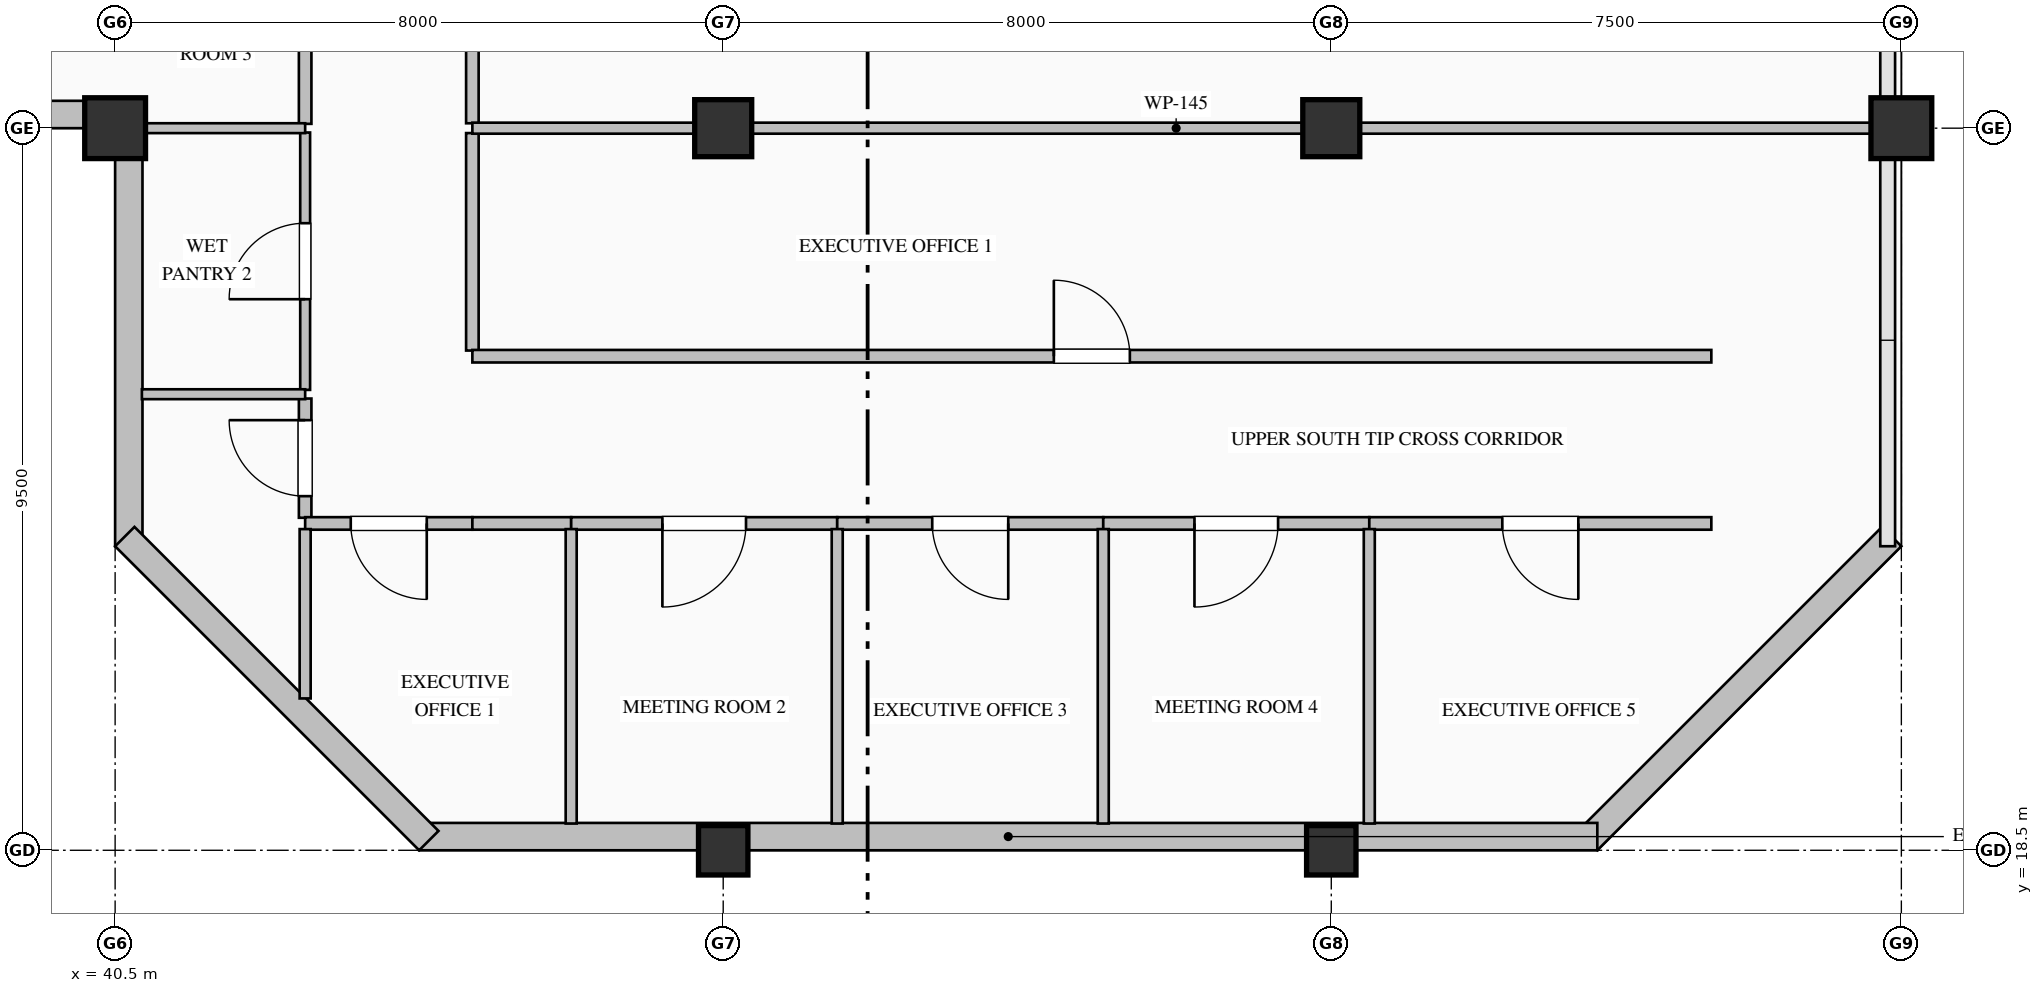
"""IFC4 building model, lengths in metres.
Left out: names, types, materials, properties, quantities, classifications, styles, units other than length and angle.
Written with IfcOpenShell. Run it as: python <this file> out.ifc"""

import sys

from ifc_helpers import new_model, si_unit, direction, frame, frame_2d, origin, origin_2d, place, context, subcontext, project, spatial, rectangle, hollow_rectangle, extrude, element, fill, save


model = new_model("IFC4")
c1 = context("Model", 3, precision=1e-05, world=origin(), true_north=direction((0.0, 1.0)))
c2 = subcontext(c1, "Body", "Model", "MODEL_VIEW")
j1 = project(units=[si_unit("LENGTHUNIT", "METRE"), si_unit("PLANEANGLEUNIT", "RADIAN")], contexts=[c1])
p1 = place(None, origin())
s1 = spatial("IfcSite", under=j1, at=p1, CompositionType="ELEMENT")
p2 = place(p1, origin())
s2 = spatial("IfcBuilding", under=s1, at=p2, CompositionType="ELEMENT")
p3 = place(p2, frame((0.0, 0.0, 299.2)))
s3 = spatial("IfcBuildingStorey", under=s2, at=p3, CompositionType="ELEMENT", Elevation=299.2)
p4 = place(p3, frame((40.5, 28.0, 0.0), z_axis=(0.0, 0.0, 1.0), x_axis=(1.0, 0.0, 0.0)))
e1 = element("IfcColumn", 1, at=p4, inside=s3, PredefinedType="COLUMN", context=c2, shape_type="SweptSolid", body=[
    extrude(hollow_rectangle(XDim=0.8, YDim=0.8, WallThickness=0.032, at=origin_2d()), origin(), (0.0, 0.0, 1.0), 4.0),
])
p5 = place(p3, frame((48.5, 18.5, 0.0), z_axis=(0.0, 0.0, 1.0), x_axis=(1.0, 0.0, 0.0)))
e2 = element("IfcColumn", 2, at=p5, inside=s3, PredefinedType="COLUMN", context=c2, shape_type="SweptSolid", body=[
    extrude(hollow_rectangle(XDim=0.65, YDim=0.65, WallThickness=0.028, at=origin_2d()), origin(), (0.0, 0.0, 1.0), 4.0),
])
p6 = place(p3, frame((48.5, 28.0, 0.0), z_axis=(0.0, 0.0, 1.0), x_axis=(1.0, 0.0, 0.0)))
e3 = element("IfcColumn", 3, at=p6, inside=s3, PredefinedType="COLUMN", context=c2, shape_type="SweptSolid", body=[
    extrude(rectangle(XDim=0.75, YDim=0.75, at=origin_2d()), origin(), (0.0, 0.0, 1.0), 4.0),
])
p7 = place(p3, frame((56.5, 18.5, 0.0), z_axis=(0.0, 0.0, 1.0), x_axis=(1.0, 0.0, 0.0)))
e4 = element("IfcColumn", 4, at=p7, inside=s3, PredefinedType="COLUMN", context=c2, shape_type="SweptSolid", body=[
    extrude(hollow_rectangle(XDim=0.65, YDim=0.65, WallThickness=0.028, at=origin_2d()), origin(), (0.0, 0.0, 1.0), 4.0),
])
p8 = place(p3, frame((56.5, 28.0, 0.0), z_axis=(0.0, 0.0, 1.0), x_axis=(1.0, 0.0, 0.0)))
e5 = element("IfcColumn", 5, at=p8, inside=s3, PredefinedType="COLUMN", context=c2, shape_type="SweptSolid", body=[
    extrude(rectangle(XDim=0.75, YDim=0.75, at=origin_2d()), origin(), (0.0, 0.0, 1.0), 4.0),
])
p9 = place(p3, frame((64.0, 28.0, 0.0), z_axis=(0.0, 0.0, 1.0), x_axis=(1.0, 0.0, 0.0)))
e6 = element("IfcColumn", 6, at=p9, inside=s3, PredefinedType="COLUMN", context=c2, shape_type="SweptSolid", body=[
    extrude(hollow_rectangle(XDim=0.8, YDim=0.8, WallThickness=0.032, at=origin_2d()), origin(), (0.0, 0.0, 1.0), 4.0),
])
p10 = place(p3, frame((40.68, 22.5, 0.0), z_axis=(0.0, 0.0, 1.0), x_axis=(0.0, 1.0, 0.0)))
e7 = element("IfcWall", 7, at=p10, inside=s3, PredefinedType="SOLIDWALL", context=c2, shape_type="SweptSolid", body=[
    extrude(rectangle(XDim=5.86, YDim=0.36, at=frame_2d((2.93, 0.0))), origin(), (0.0, 0.0, 1.0), 3.185),
])
p11 = place(p3, frame((40.52, 28.18, 0.0), z_axis=(0.0, 0.0, 1.0), x_axis=(-1.0, 0.0, 0.0)))
e8 = element("IfcWall", 8, at=p11, inside=s3, PredefinedType="SOLIDWALL", context=c2, shape_type="SweptSolid", body=[
    extrude(rectangle(XDim=20.02, YDim=0.36, at=frame_2d((10.01, 0.0))), origin(), (0.0, 0.0, 1.0), 3.185),
])
p12 = place(p11, frame((3.075, 0.0, 0.8)))
e9 = element("IfcOpeningElement", 9, at=p12, cuts=e8, PredefinedType="OPENING", context=c2, shape_type="SweptSolid", body=[
    extrude(rectangle(XDim=1.05, YDim=2.15, at=frame_2d((0.525, 1.075))), frame((0.0, 0.19, 0.0), z_axis=(0.0, -1.0, 0.0), x_axis=(1.0, 0.0, 0.0)), (0.0, 0.0, 1.0), 0.38),
])
p13 = place(p11, frame((10.325, 0.0, 0.9)))
e10 = element("IfcOpeningElement", 10, at=p13, cuts=e8, PredefinedType="OPENING", context=c2, shape_type="SweptSolid", body=[
    extrude(rectangle(XDim=0.95, YDim=1.85, at=frame_2d((0.475, 0.925))), frame((0.0, 0.19, 0.0), z_axis=(0.0, -1.0, 0.0), x_axis=(1.0, 0.0, 0.0)), (0.0, 0.0, 1.0), 0.38),
])
p14 = place(p11, frame((13.875, 0.0, 0.8)))
e11 = element("IfcOpeningElement", 11, at=p14, cuts=e8, PredefinedType="OPENING", context=c2, shape_type="SweptSolid", body=[
    extrude(rectangle(XDim=1.05, YDim=2.15, at=frame_2d((0.525, 1.075))), frame((0.0, 0.19, 0.0), z_axis=(0.0, -1.0, 0.0), x_axis=(1.0, 0.0, 0.0)), (0.0, 0.0, 1.0), 0.38),
])
p15 = place(p3, frame((63.873, 22.627, 0.0), z_axis=(0.0, 0.0, 1.0), x_axis=(-0.707106781187, -0.707106781187, 0.0)))
e12 = element("IfcWall", 12, at=p15, inside=s3, PredefinedType="SOLIDWALL", context=c2, shape_type="SweptSolid", body=[
    extrude(rectangle(XDim=5.657, YDim=0.36, at=frame_2d((2.828, 0.0))), origin(), (0.0, 0.0, 1.0), 3.785),
])
p16 = place(p3, frame((60.0, 18.68, 0.0), z_axis=(0.0, 0.0, 1.0), x_axis=(-1.0, 0.0, 0.0)))
e13 = element("IfcWall", 13, at=p16, inside=s3, PredefinedType="SOLIDWALL", context=c2, shape_type="SweptSolid", body=[
    extrude(rectangle(XDim=15.5, YDim=0.36, at=frame_2d((7.75, 0.0))), origin(), (0.0, 0.0, 1.0), 3.335),
])
p17 = place(p3, frame((44.627, 18.627, 0.0), z_axis=(0.0, 0.0, 1.0), x_axis=(-0.707106781187, 0.707106781187, 0.0)))
e14 = element("IfcWall", 14, at=p17, inside=s3, PredefinedType="SOLIDWALL", context=c2, shape_type="SweptSolid", body=[
    extrude(rectangle(XDim=5.657, YDim=0.36, at=frame_2d((2.828, 0.0))), origin(), (0.0, 0.0, 1.0), 3.785),
])
p18 = place(p3, frame((45.2, 27.936, 0.0), z_axis=(0.0, 0.0, 1.0), x_axis=(0.0, -1.0, 0.0)))
e15 = element("IfcWall", 15, at=p18, inside=s3, PredefinedType="PARTITIONING", context=c2, shape_type="SweptSolid", body=[
    extrude(rectangle(XDim=2.861, YDim=0.165, at=frame_2d((1.431, 0.0))), origin(), (0.0, 0.0, 1.0), 3.785),
])
p19 = place(p3, frame((45.2, 31.736, 0.0), z_axis=(0.0, 0.0, 1.0), x_axis=(0.0, -1.0, 0.0)))
e16 = element("IfcWall", 16, at=p19, inside=s3, PredefinedType="PARTITIONING", context=c2, shape_type="SweptSolid", body=[
    extrude(rectangle(XDim=3.671, YDim=0.165, at=frame_2d((1.835, 0.0))), origin(), (0.0, 0.0, 1.0), 3.785),
])
p20 = place(p19, frame((1.285, 0.0, 0.0)))
e17 = element("IfcOpeningElement", 17, at=p20, cuts=e16, PredefinedType="OPENING", context=c2, shape_type="SweptSolid", body=[
    extrude(rectangle(XDim=1.1, YDim=2.2, at=frame_2d((0.55, 1.1))), frame((0.0, 0.093, 0.0), z_axis=(0.0, -1.0, 0.0), x_axis=(1.0, 0.0, 0.0)), (0.0, 0.0, 1.0), 0.185),
])
p21 = place(p3, frame((43.0, 22.875, 0.0), z_axis=(0.0, 0.0, 1.0), x_axis=(0.0, 1.0, 0.0)))
e18 = element("IfcWall", 18, at=p21, inside=s3, PredefinedType="PARTITIONING", context=c2, shape_type="SweptSolid", body=[
    extrude(rectangle(XDim=1.569, YDim=0.165, at=frame_2d((0.784, 0.0))), origin(), (0.0, 0.0, 1.0), 3.785),
])
p22 = place(p21, frame((0.284, 0.0, 0.0)))
e19 = element("IfcOpeningElement", 19, at=p22, cuts=e18, PredefinedType="OPENING", context=c2, shape_type="SweptSolid", body=[
    extrude(rectangle(XDim=1.0, YDim=2.15, at=frame_2d((0.5, 1.075))), frame((0.0, 0.093, 0.0), z_axis=(0.0, -1.0, 0.0), x_axis=(1.0, 0.0, 0.0)), (0.0, 0.0, 1.0), 0.185),
])
p23 = place(p3, frame((43.0, 24.557, 0.0), z_axis=(0.0, 0.0, 1.0), x_axis=(0.0, 1.0, 0.0)))
e20 = element("IfcWall", 20, at=p23, inside=s3, PredefinedType="PARTITIONING", context=c2, shape_type="SweptSolid", body=[
    extrude(rectangle(XDim=3.386, YDim=0.13, at=frame_2d((1.693, 0.0))), origin(), (0.0, 0.0, 1.0), 3.785),
])
p24 = place(p23, frame((1.193, 0.0, 0.0)))
e21 = element("IfcOpeningElement", 21, at=p24, cuts=e20, PredefinedType="OPENING", context=c2, shape_type="SweptSolid", body=[
    extrude(rectangle(XDim=1.0, YDim=2.15, at=frame_2d((0.5, 1.075))), frame((0.0, 0.075, 0.0), z_axis=(0.0, -1.0, 0.0), x_axis=(1.0, 0.0, 0.0)), (0.0, 0.0, 1.0), 0.15),
])
p25 = place(p3, frame((43.0, 28.057, 0.0), z_axis=(0.0, 0.0, 1.0), x_axis=(0.0, 1.0, 0.0)))
e22 = element("IfcWall", 22, at=p25, inside=s3, PredefinedType="PARTITIONING", context=c2, shape_type="SweptSolid", body=[
    extrude(rectangle(XDim=5.469, YDim=0.165, at=frame_2d((2.734, 0.0))), origin(), (0.0, 0.0, 1.0), 3.785),
])
p26 = place(p25, frame((2.234, 0.0, 0.0)))
e23 = element("IfcOpeningElement", 23, at=p26, cuts=e22, PredefinedType="OPENING", context=c2, shape_type="SweptSolid", body=[
    extrude(rectangle(XDim=1.0, YDim=2.15, at=frame_2d((0.5, 1.075))), frame((0.0, 0.093, 0.0), z_axis=(0.0, -1.0, 0.0), x_axis=(1.0, 0.0, 0.0)), (0.0, 0.0, 1.0), 0.185),
])
p27 = place(p3, frame((45.2, 22.8, 0.0), z_axis=(0.0, 0.0, 1.0), x_axis=(-1.0, 0.0, 0.0)))
e24 = element("IfcWall", 24, at=p27, inside=s3, PredefinedType="PARTITIONING", context=c2, shape_type="SweptSolid", body=[
    extrude(rectangle(XDim=2.2, YDim=0.165, at=frame_2d((1.1, 0.0))), origin(), (0.0, 0.0, 1.0), 3.785),
])
p28 = place(p27, frame((0.6, 0.0, 0.0)))
e25 = element("IfcOpeningElement", 25, at=p28, cuts=e24, PredefinedType="OPENING", context=c2, shape_type="SweptSolid", body=[
    extrude(rectangle(XDim=1.0, YDim=2.15, at=frame_2d((0.5, 1.075))), frame((0.0, 0.093, 0.0), z_axis=(0.0, -1.0, 0.0), x_axis=(1.0, 0.0, 0.0)), (0.0, 0.0, 1.0), 0.185),
])
p29 = place(p3, frame((45.2, 25.0, 0.0), z_axis=(0.0, 0.0, 1.0), x_axis=(1.0, 0.0, 0.0)))
e26 = element("IfcWall", 26, at=p29, inside=s3, PredefinedType="PARTITIONING", context=c2, shape_type="SweptSolid", body=[
    extrude(rectangle(XDim=16.3, YDim=0.165, at=frame_2d((8.15, 0.0))), origin(), (0.0, 0.0, 1.0), 3.785),
])
p30 = place(p29, frame((7.65, 0.0, 0.0)))
e27 = element("IfcOpeningElement", 27, at=p30, cuts=e26, PredefinedType="OPENING", context=c2, shape_type="SweptSolid", body=[
    extrude(rectangle(XDim=1.0, YDim=2.15, at=frame_2d((0.5, 1.075))), frame((0.0, 0.093, 0.0), z_axis=(0.0, -1.0, 0.0), x_axis=(1.0, 0.0, 0.0)), (0.0, 0.0, 1.0), 0.185),
])
p31 = place(p3, frame((46.5, 22.8, 0.0), z_axis=(0.0, 0.0, 1.0), x_axis=(-1.0, 0.0, 0.0)))
e28 = element("IfcWall", 28, at=p31, inside=s3, PredefinedType="PARTITIONING", context=c2, shape_type="SweptSolid", body=[
    extrude(rectangle(XDim=1.3, YDim=0.165, at=frame_2d((0.65, 0.0))), origin(), (0.0, 0.0, 1.0), 3.785),
])
p32 = place(p3, frame((50.0, 22.8, 0.0), z_axis=(0.0, 0.0, 1.0), x_axis=(-1.0, 0.0, 0.0)))
e29 = element("IfcWall", 29, at=p32, inside=s3, PredefinedType="PARTITIONING", context=c2, shape_type="SweptSolid", body=[
    extrude(rectangle(XDim=3.5, YDim=0.165, at=frame_2d((1.75, 0.0))), origin(), (0.0, 0.0, 1.0), 3.785),
])
p33 = place(p32, frame((1.2, 0.0, 0.0)))
e30 = element("IfcOpeningElement", 30, at=p33, cuts=e29, PredefinedType="OPENING", context=c2, shape_type="SweptSolid", body=[
    extrude(rectangle(XDim=1.1, YDim=2.2, at=frame_2d((0.55, 1.1))), frame((0.0, 0.093, 0.0), z_axis=(0.0, -1.0, 0.0), x_axis=(1.0, 0.0, 0.0)), (0.0, 0.0, 1.0), 0.185),
])
p34 = place(p3, frame((53.5, 22.8, 0.0), z_axis=(0.0, 0.0, 1.0), x_axis=(-1.0, 0.0, 0.0)))
e31 = element("IfcWall", 31, at=p34, inside=s3, PredefinedType="PARTITIONING", context=c2, shape_type="SweptSolid", body=[
    extrude(rectangle(XDim=3.5, YDim=0.165, at=frame_2d((1.75, 0.0))), origin(), (0.0, 0.0, 1.0), 3.785),
])
p35 = place(p34, frame((1.25, 0.0, 0.0)))
e32 = element("IfcOpeningElement", 32, at=p35, cuts=e31, PredefinedType="OPENING", context=c2, shape_type="SweptSolid", body=[
    extrude(rectangle(XDim=1.0, YDim=2.15, at=frame_2d((0.5, 1.075))), frame((0.0, 0.093, 0.0), z_axis=(0.0, -1.0, 0.0), x_axis=(1.0, 0.0, 0.0)), (0.0, 0.0, 1.0), 0.185),
])
p36 = place(p3, frame((57.0, 22.8, 0.0), z_axis=(0.0, 0.0, 1.0), x_axis=(-1.0, 0.0, 0.0)))
e33 = element("IfcWall", 33, at=p36, inside=s3, PredefinedType="PARTITIONING", context=c2, shape_type="SweptSolid", body=[
    extrude(rectangle(XDim=3.5, YDim=0.165, at=frame_2d((1.75, 0.0))), origin(), (0.0, 0.0, 1.0), 3.785),
])
p37 = place(p36, frame((1.2, 0.0, 0.0)))
e34 = element("IfcOpeningElement", 34, at=p37, cuts=e33, PredefinedType="OPENING", context=c2, shape_type="SweptSolid", body=[
    extrude(rectangle(XDim=1.1, YDim=2.2, at=frame_2d((0.55, 1.1))), frame((0.0, 0.093, 0.0), z_axis=(0.0, -1.0, 0.0), x_axis=(1.0, 0.0, 0.0)), (0.0, 0.0, 1.0), 0.185),
])
p38 = place(p3, frame((61.5, 22.8, 0.0), z_axis=(0.0, 0.0, 1.0), x_axis=(-1.0, 0.0, 0.0)))
e35 = element("IfcWall", 35, at=p38, inside=s3, PredefinedType="PARTITIONING", context=c2, shape_type="SweptSolid", body=[
    extrude(rectangle(XDim=4.5, YDim=0.165, at=frame_2d((2.25, 0.0))), origin(), (0.0, 0.0, 1.0), 3.785),
])
p39 = place(p38, frame((1.75, 0.0, 0.0)))
e36 = element("IfcOpeningElement", 36, at=p39, cuts=e35, PredefinedType="OPENING", context=c2, shape_type="SweptSolid", body=[
    extrude(rectangle(XDim=1.0, YDim=2.15, at=frame_2d((0.5, 1.075))), frame((0.0, 0.093, 0.0), z_axis=(0.0, -1.0, 0.0), x_axis=(1.0, 0.0, 0.0)), (0.0, 0.0, 1.0), 0.185),
])
p40 = place(p3, frame((45.2, 28.0, 0.0), z_axis=(0.0, 0.0, 1.0), x_axis=(1.0, 0.0, 0.0)))
e37 = element("IfcWall", 37, at=p40, inside=s3, PredefinedType="PARTITIONING", context=c2, shape_type="SweptSolid", body=[
    extrude(rectangle(XDim=18.518, YDim=0.145, at=frame_2d((9.259, 0.0))), origin(), (0.0, 0.0, 1.0), 3.177),
])
p41 = place(p3, frame((40.852, 24.5, 0.0), z_axis=(0.0, 0.0, 1.0), x_axis=(1.0, 0.0, 0.0)))
e38 = element("IfcWall", 38, at=p41, inside=s3, PredefinedType="PARTITIONING", context=c2, shape_type="SweptSolid", body=[
    extrude(rectangle(XDim=2.148, YDim=0.13, at=frame_2d((1.074, 0.0))), origin(), (0.0, 0.0, 1.0), 3.785),
])
p42 = place(p3, frame((43.0, 22.726, 0.0), z_axis=(0.0, 0.0, 1.0), x_axis=(0.0, -1.0, 0.0)))
e39 = element("IfcWall", 39, at=p42, inside=s3, PredefinedType="PARTITIONING", context=c2, shape_type="SweptSolid", body=[
    extrude(rectangle(XDim=2.228, YDim=0.145, at=frame_2d((1.114, 0.0))), origin(), (0.0, 0.0, 1.0), 3.785),
])
p43 = place(p3, frame((40.852, 28.0, 0.0), z_axis=(0.0, 0.0, 1.0), x_axis=(1.0, 0.0, 0.0)))
e40 = element("IfcWall", 40, at=p43, inside=s3, PredefinedType="PARTITIONING", context=c2, shape_type="SweptSolid", body=[
    extrude(rectangle(XDim=2.148, YDim=0.13, at=frame_2d((1.074, 0.0))), origin(), (0.0, 0.0, 1.0), 3.177),
])
for number, where, z_axis, x_axis in (
    (41, (46.5, 22.726, 0.0), (0.0, 0.0, 1.0), (0.0, -1.0, 0.0)),
    (42, (50.0, 22.726, 0.0), (0.0, 0.0, 1.0), (0.0, -1.0, 0.0)),
    (43, (53.5, 22.726, 0.0), (0.0, 0.0, 1.0), (0.0, -1.0, 0.0)),
    (44, (57.0, 22.726, 0.0), (0.0, 0.0, 1.0), (0.0, -1.0, 0.0)),
):
    element("IfcWall", number, at=place(p3, frame(where, z_axis=z_axis, x_axis=x_axis)), inside=s3, PredefinedType="PARTITIONING", context=c2, shape_type="SweptSolid", body=[
        extrude(rectangle(XDim=3.874, YDim=0.145, at=frame_2d((1.937, 0.0))), origin(), (0.0, 0.0, 1.0), 3.785),
    ])
p44 = place(p30, origin())
e45 = element("IfcDoor", 45, at=p44, inside=s3, OperationType="SINGLE_SWING_LEFT", PredefinedType="DOOR", context=c2, shape_type="SweptSolid", body=[
    extrude(rectangle(XDim=1.0, YDim=2.15, at=frame_2d((0.5, 1.075))), frame((0.0, 0.025, 0.0), z_axis=(0.0, -1.0, 0.0), x_axis=(1.0, 0.0, 0.0)), (0.0, 0.0, 1.0), 0.05),
])
fill(e27, e45)
p45 = place(p22, origin())
e46 = element("IfcDoor", 46, at=p45, inside=s3, OperationType="SINGLE_SWING_RIGHT", PredefinedType="DOOR", context=c2, shape_type="SweptSolid", body=[
    extrude(rectangle(XDim=1.0, YDim=2.15, at=frame_2d((0.5, 1.075))), frame((0.0, 0.025, 0.0), z_axis=(0.0, -1.0, 0.0), x_axis=(1.0, 0.0, 0.0)), (0.0, 0.0, 1.0), 0.05),
])
fill(e19, e46)
p46 = place(p24, origin())
e47 = element("IfcDoor", 47, at=p46, inside=s3, OperationType="SINGLE_SWING_LEFT", PredefinedType="DOOR", context=c2, shape_type="SweptSolid", body=[
    extrude(rectangle(XDim=1.0, YDim=2.15, at=frame_2d((0.5, 1.075))), frame((0.0, 0.025, 0.0), z_axis=(0.0, -1.0, 0.0), x_axis=(1.0, 0.0, 0.0)), (0.0, 0.0, 1.0), 0.05),
])
fill(e21, e47)
p47 = place(p28, origin())
e48 = element("IfcDoor", 48, at=p47, inside=s3, OperationType="SINGLE_SWING_LEFT", PredefinedType="DOOR", context=c2, shape_type="SweptSolid", body=[
    extrude(rectangle(XDim=1.0, YDim=2.15, at=frame_2d((0.5, 1.075))), frame((0.0, 0.025, 0.0), z_axis=(0.0, -1.0, 0.0), x_axis=(1.0, 0.0, 0.0)), (0.0, 0.0, 1.0), 0.05),
])
fill(e25, e48)
p48 = place(p33, origin())
e49 = element("IfcDoor", 49, at=p48, inside=s3, OperationType="SINGLE_SWING_RIGHT", PredefinedType="DOOR", context=c2, shape_type="SweptSolid", body=[
    extrude(rectangle(XDim=1.1, YDim=2.2, at=frame_2d((0.55, 1.1))), frame((0.0, 0.025, 0.0), z_axis=(0.0, -1.0, 0.0), x_axis=(1.0, 0.0, 0.0)), (0.0, 0.0, 1.0), 0.05),
])
fill(e30, e49)
p49 = place(p35, origin())
e50 = element("IfcDoor", 50, at=p49, inside=s3, OperationType="SINGLE_SWING_LEFT", PredefinedType="DOOR", context=c2, shape_type="SweptSolid", body=[
    extrude(rectangle(XDim=1.0, YDim=2.15, at=frame_2d((0.5, 1.075))), frame((0.0, 0.025, 0.0), z_axis=(0.0, -1.0, 0.0), x_axis=(1.0, 0.0, 0.0)), (0.0, 0.0, 1.0), 0.05),
])
fill(e32, e50)
p50 = place(p37, origin())
e51 = element("IfcDoor", 51, at=p50, inside=s3, OperationType="SINGLE_SWING_RIGHT", PredefinedType="DOOR", context=c2, shape_type="SweptSolid", body=[
    extrude(rectangle(XDim=1.1, YDim=2.2, at=frame_2d((0.55, 1.1))), frame((0.0, 0.025, 0.0), z_axis=(0.0, -1.0, 0.0), x_axis=(1.0, 0.0, 0.0)), (0.0, 0.0, 1.0), 0.05),
])
fill(e34, e51)
p51 = place(p39, origin())
e52 = element("IfcDoor", 52, at=p51, inside=s3, OperationType="SINGLE_SWING_LEFT", PredefinedType="DOOR", context=c2, shape_type="SweptSolid", body=[
    extrude(rectangle(XDim=1.0, YDim=2.15, at=frame_2d((0.5, 1.075))), frame((0.0, 0.025, 0.0), z_axis=(0.0, -1.0, 0.0), x_axis=(1.0, 0.0, 0.0)), (0.0, 0.0, 1.0), 0.05),
])
fill(e36, e52)
save(model, sys.argv[1])
